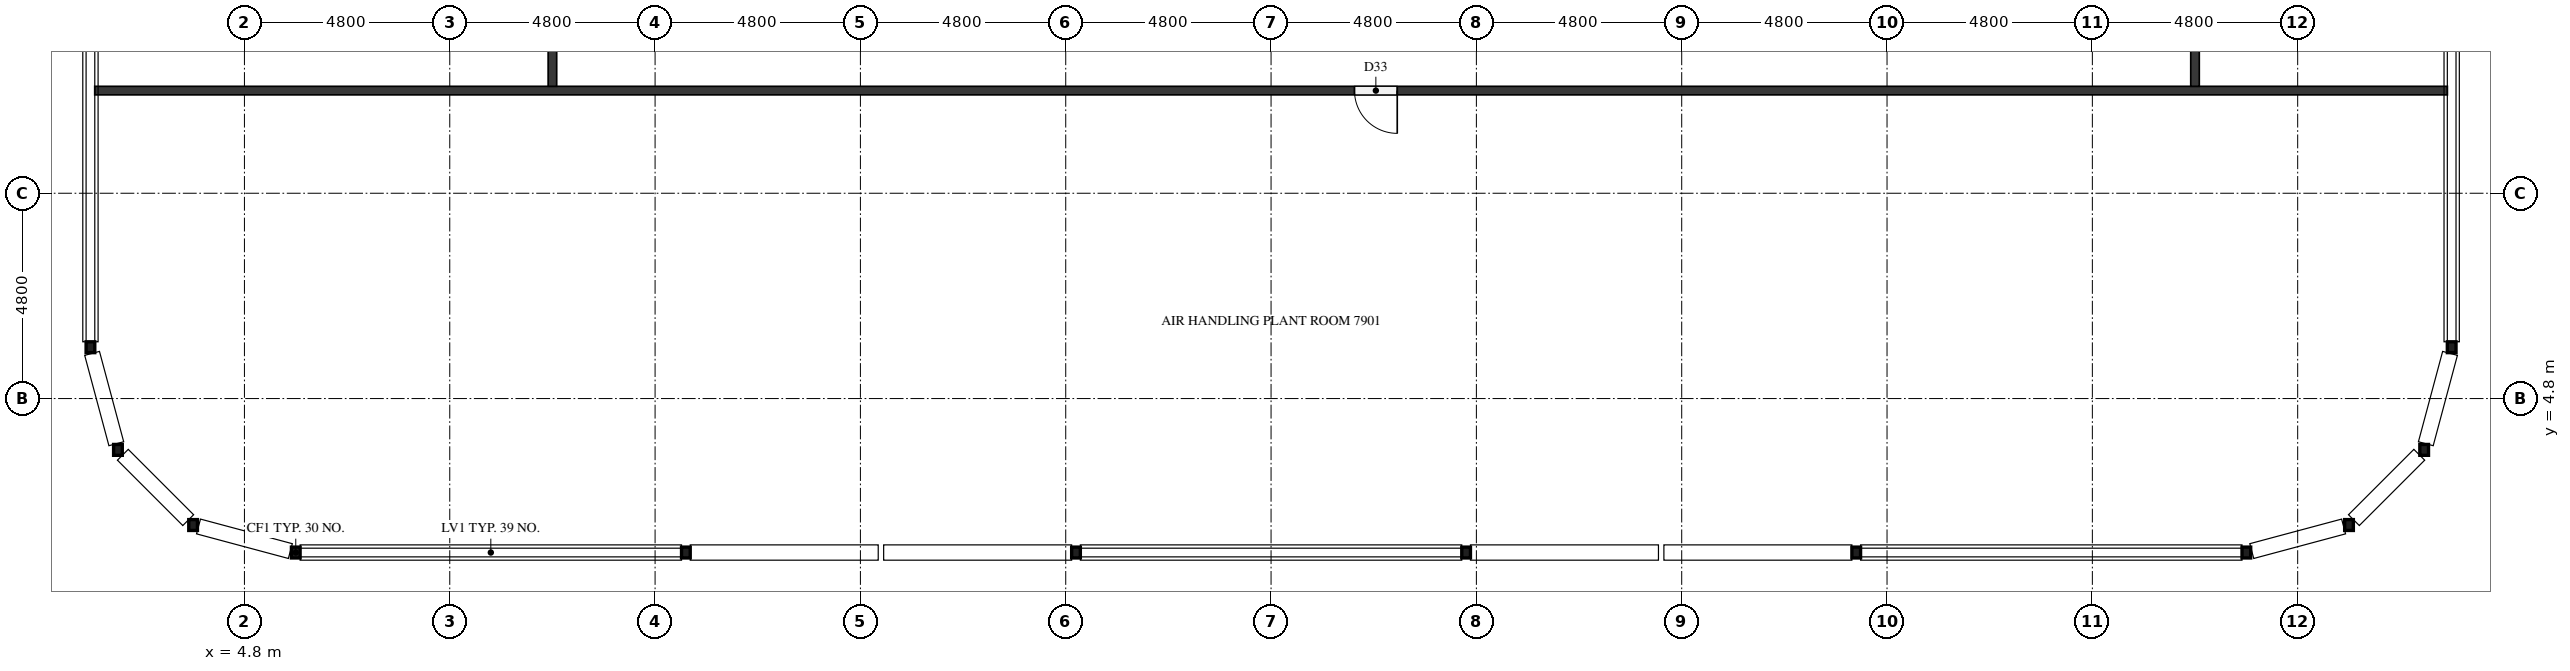
"""IFC4 building model, lengths in metres.
Left out: names, types, materials, properties, quantities, classifications, styles, units other than length and angle.
Written with IfcOpenShell. Run it as: python <this file> out.ifc"""

import sys

from ifc_helpers import new_model, si_unit, direction, frame, frame_2d, origin, origin_2d, place, context, subcontext, project, spatial, rectangle, hollow_rectangle, extrude, element, fill, save


model = new_model("IFC4")
c1 = context("Model", 3, precision=1e-05, world=origin(), true_north=direction((0.0, 1.0)))
c2 = subcontext(c1, "Body", "Model", "MODEL_VIEW")
j1 = project(units=[si_unit("LENGTHUNIT", "METRE"), si_unit("PLANEANGLEUNIT", "RADIAN")], contexts=[c1])
p1 = place(None, origin())
s1 = spatial("IfcSite", under=j1, at=p1, CompositionType="ELEMENT")
p2 = place(p1, origin())
s2 = spatial("IfcBuilding", under=s1, at=p2, CompositionType="ELEMENT")
p3 = place(p2, frame((0.0, 0.0, 305.9)))
s3 = spatial("IfcBuildingStorey", under=s2, at=p3, CompositionType="ELEMENT", Elevation=305.9)
for number, where, z_axis, x_axis in (
    (1, (6.0, 1.2, 0.0), (0.0, 0.0, 1.0), (1.0, 0.0, 0.0)),
    (2, (15.12, 1.2, 0.0), (0.0, 0.0, 1.0), (1.0, 0.0, 0.0)),
    (3, (24.24, 1.2, 0.0), (0.0, 0.0, 1.0), (1.0, 0.0, 0.0)),
    (4, (33.36, 1.2, 0.0), (0.0, 0.0, 1.0), (1.0, 0.0, 0.0)),
    (5, (42.48, 1.2, 0.0), (0.0, 0.0, 1.0), (1.0, 0.0, 0.0)),
    (6, (51.6, 1.2, 0.0), (0.0, 0.0, 1.0), (1.0, 0.0, 0.0)),
    (7, (54.0, 1.843, 0.0), (0.0, 0.0, 1.0), (1.0, 0.0, 0.0)),
    (8, (55.757, 3.6, 0.0), (0.0, 0.0, 1.0), (1.0, 0.0, 0.0)),
    (9, (56.4, 6.0, 0.0), (0.0, 0.0, 1.0), (1.0, 0.0, 0.0)),
    (10, (1.2, 6.0, 0.0), (0.0, 0.0, 1.0), (1.0, 0.0, 0.0)),
    (11, (1.843, 3.6, 0.0), (0.0, 0.0, 1.0), (1.0, 0.0, 0.0)),
    (12, (3.6, 1.843, 0.0), (0.0, 0.0, 1.0), (1.0, 0.0, 0.0)),
):
    element("IfcColumn", number, at=place(p3, frame(where, z_axis=z_axis, x_axis=x_axis)), inside=s3, PredefinedType="COLUMN", context=c2, shape_type="SweptSolid", body=[
        extrude(hollow_rectangle(XDim=0.203, YDim=0.254, WallThickness=0.01, InnerFilletRadius=0.004, OuterFilletRadius=0.013, at=origin_2d()), origin(), (0.0, 0.0, 1.0), 3.8),
    ])
p4 = place(p3, frame((56.3, 12.0, 0.0), z_axis=(0.0, 0.0, 1.0), x_axis=(-1.0, 0.0, 0.0)))
e13 = element("IfcWall", 13, at=p4, inside=s3, PredefinedType="PARTITIONING", context=c2, shape_type="SweptSolid", body=[
    extrude(rectangle(XDim=55.0, YDim=0.2, at=frame_2d((27.5, 0.0))), origin(), (0.0, 0.0, 1.0), 3.8),
])
p5 = place(p4, frame((24.55, 0.0, 0.0)))
e14 = element("IfcOpeningElement", 14, at=p5, cuts=e13, PredefinedType="OPENING", context=c2, shape_type="SweptSolid", body=[
    extrude(rectangle(XDim=1.0, YDim=2.1, at=frame_2d((0.5, 1.05))), frame((0.0, 0.11, 0.0), z_axis=(0.0, -1.0, 0.0), x_axis=(1.0, 0.0, 0.0)), (0.0, 0.0, 1.0), 0.22),
])
p6 = place(p3, frame((12.0, 12.1, 0.0), z_axis=(0.0, 0.0, 1.0), x_axis=(0.0, 1.0, 0.0)))
e15 = element("IfcWall", 15, at=p6, inside=s3, PredefinedType="PARTITIONING", context=c2, shape_type="SweptSolid", body=[
    extrude(rectangle(XDim=28.6, YDim=0.2, at=frame_2d((14.3, 0.0))), origin(), (0.0, 0.0, 1.0), 3.8),
])
p7 = place(p6, frame((13.75, 0.0, 0.0)))
e16 = element("IfcOpeningElement", 16, at=p7, cuts=e15, PredefinedType="OPENING", context=c2, shape_type="SweptSolid", body=[
    extrude(rectangle(XDim=1.0, YDim=2.1, at=frame_2d((0.5, 1.05))), frame((0.0, 0.11, 0.0), z_axis=(0.0, -1.0, 0.0), x_axis=(1.0, 0.0, 0.0)), (0.0, 0.0, 1.0), 0.22),
])
p8 = place(p3, frame((50.4, 40.7, 0.0), z_axis=(0.0, 0.0, 1.0), x_axis=(0.0, -1.0, 0.0)))
e17 = element("IfcWall", 17, at=p8, inside=s3, PredefinedType="PARTITIONING", context=c2, shape_type="SweptSolid", body=[
    extrude(rectangle(XDim=28.6, YDim=0.2, at=frame_2d((14.3, 0.0))), origin(), (0.0, 0.0, 1.0), 3.8),
])
p9 = place(p8, frame((13.75, 0.0, 0.0)))
e18 = element("IfcOpeningElement", 18, at=p9, cuts=e17, PredefinedType="OPENING", context=c2, shape_type="SweptSolid", body=[
    extrude(rectangle(XDim=1.0, YDim=2.1, at=frame_2d((0.5, 1.05))), frame((0.0, 0.11, 0.0), z_axis=(0.0, -1.0, 0.0), x_axis=(1.0, 0.0, 0.0)), (0.0, 0.0, 1.0), 0.22),
])
p10 = place(p5, origin())
e19 = element("IfcDoor", 19, at=p10, inside=s3, OperationType="SINGLE_SWING_LEFT", PredefinedType="DOOR", context=c2, shape_type="SweptSolid", body=[
    extrude(rectangle(XDim=1.0, YDim=2.1, at=frame_2d((0.5, 1.05))), frame((0.0, 0.025, 0.0), z_axis=(0.0, -1.0, 0.0), x_axis=(1.0, 0.0, 0.0)), (0.0, 0.0, 1.0), 0.05),
])
fill(e14, e19)
save(model, sys.argv[1])
